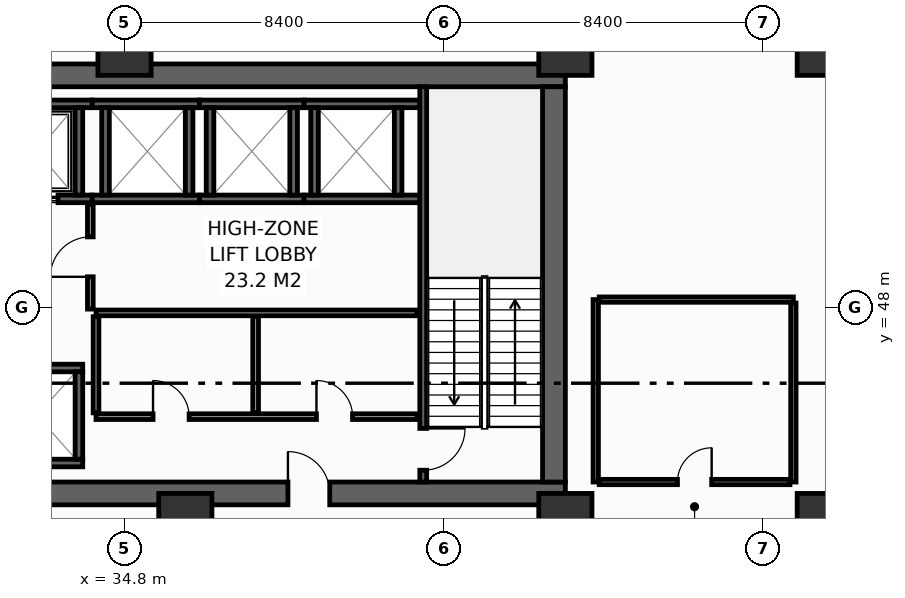
"""IFC4 building model, lengths in metres.
Left out: names, types, materials, properties, quantities, classifications, styles, units other than length and angle.
Written with IfcOpenShell. Run it as: python <this file> out.ifc"""

import sys

from ifc_helpers import new_model, si_unit, direction, frame, frame_2d, origin, origin_2d, place, context, subcontext, project, spatial, rectangle, hollow_rectangle, extrude, element, fill, save


model = new_model("IFC4")
c1 = context("Model", 3, precision=1e-05, world=origin(), true_north=direction((0.0, 1.0)))
c2 = subcontext(c1, "Body", "Model", "MODEL_VIEW")
j1 = project(units=[si_unit("LENGTHUNIT", "METRE"), si_unit("PLANEANGLEUNIT", "RADIAN")], contexts=[c1])
p1 = place(None, origin())
s1 = spatial("IfcSite", under=j1, at=p1, CompositionType="ELEMENT")
p2 = place(p1, origin())
s2 = spatial("IfcBuilding", under=s1, at=p2, CompositionType="ELEMENT")
p3 = place(p2, frame((0.0, 0.0, 11.4)))
s3 = spatial("IfcBuildingStorey", under=s2, at=p3, CompositionType="ELEMENT", Elevation=11.4)
p4 = place(p3, frame((13.5, 43.1, 0.0), z_axis=(0.0, 0.0, 1.0), x_axis=(1.0, 0.0, 0.0)))
e1 = element("IfcWall", 1, at=p4, inside=s3, PredefinedType="SHEAR", context=c2, shape_type="SweptSolid", body=[
    extrude(rectangle(XDim=32.9, YDim=0.6, at=frame_2d((16.45, 0.0))), origin(), (0.0, 0.0, 1.0), 5.1),
])
p5 = place(p4, frame((5.4, 0.0, 0.0)))
e2 = element("IfcOpeningElement", 2, at=p5, cuts=e1, PredefinedType="OPENING", context=c2, shape_type="SweptSolid", body=[
    extrude(rectangle(XDim=1.1, YDim=2.15, at=frame_2d((0.55, 1.075))), frame((0.0, 0.31, 0.0), z_axis=(0.0, -1.0, 0.0), x_axis=(1.0, 0.0, 0.0)), (0.0, 0.0, 1.0), 0.62),
])
p6 = place(p4, frame((25.6, 0.0, 0.0)))
e3 = element("IfcOpeningElement", 3, at=p6, cuts=e1, PredefinedType="OPENING", context=c2, shape_type="SweptSolid", body=[
    extrude(rectangle(XDim=1.1, YDim=2.15, at=frame_2d((0.55, 1.075))), frame((0.0, 0.31, 0.0), z_axis=(0.0, -1.0, 0.0), x_axis=(1.0, 0.0, 0.0)), (0.0, 0.0, 1.0), 0.62),
])
p7 = place(p3, frame((13.5, 54.1, 0.0), z_axis=(0.0, 0.0, 1.0), x_axis=(1.0, 0.0, 0.0)))
e4 = element("IfcWall", 4, at=p7, inside=s3, PredefinedType="SHEAR", context=c2, shape_type="SweptSolid", body=[
    extrude(rectangle(XDim=32.9, YDim=0.6, at=frame_2d((16.45, 0.0))), origin(), (0.0, 0.0, 1.0), 5.1),
])
p8 = place(p3, frame((46.1, 43.4, 0.0), z_axis=(0.0, 0.0, 1.0), x_axis=(0.0, 1.0, 0.0)))
e5 = element("IfcWall", 5, at=p8, inside=s3, PredefinedType="SHEAR", context=c2, shape_type="SweptSolid", body=[
    extrude(rectangle(XDim=10.4, YDim=0.6, at=frame_2d((5.2, 0.0))), origin(), (0.0, 0.0, 1.0), 5.1),
])
for number, where, z_axis, x_axis in (
    (6, (34.8, 54.8, 0.0), (0.0, 0.0, 1.0), (1.0, 0.0, 0.0)),
    (7, (46.4, 54.8, 0.0), (0.0, 0.0, 1.0), (1.0, 0.0, 0.0)),
    (8, (53.2, 54.8, 0.0), (0.0, 0.0, 1.0), (1.0, 0.0, 0.0)),
    (9, (36.4, 42.4, 0.0), (0.0, 0.0, 1.0), (1.0, 0.0, 0.0)),
    (10, (46.4, 42.4, 0.0), (0.0, 0.0, 1.0), (1.0, 0.0, 0.0)),
    (11, (53.2, 42.4, 0.0), (0.0, 0.0, 1.0), (1.0, 0.0, 0.0)),
):
    element("IfcColumn", number, at=place(p3, frame(where, z_axis=z_axis, x_axis=x_axis)), inside=s3, PredefinedType="COLUMN", context=c2, shape_type="SweptSolid", body=[
        extrude(hollow_rectangle(XDim=1.4, YDim=1.4, WallThickness=0.065, at=origin_2d()), origin(), (0.0, 0.0, 1.0), 5.4),
    ])
p9 = place(p3, frame((31.125, 50.85, 0.0), z_axis=(0.0, 0.0, 1.0), x_axis=(1.0, 0.0, 0.0)))
e12 = element("IfcWall", 12, at=p9, inside=s3, PredefinedType="SHEAR", context=c2, shape_type="SweptSolid", body=[
    extrude(rectangle(XDim=2.825, YDim=0.2, at=frame_2d((1.413, 0.0))), origin(), (0.0, 0.0, 1.0), 5.1),
])
p10 = place(p9, frame((0.825, 0.0, 0.0)))
e13 = element("IfcOpeningElement", 13, at=p10, cuts=e12, PredefinedType="OPENING", context=c2, shape_type="SweptSolid", body=[
    extrude(rectangle(XDim=1.1, YDim=2.2, at=frame_2d((0.55, 1.1))), frame((0.0, 0.11, 0.0), z_axis=(0.0, -1.0, 0.0), x_axis=(1.0, 0.0, 0.0)), (0.0, 0.0, 1.0), 0.22),
])
p11 = place(p3, frame((31.125, 53.35, 0.0), z_axis=(0.0, 0.0, 1.0), x_axis=(1.0, 0.0, 0.0)))
e14 = element("IfcWall", 14, at=p11, inside=s3, PredefinedType="SHEAR", context=c2, shape_type="SweptSolid", body=[
    extrude(rectangle(XDim=2.825, YDim=0.2, at=frame_2d((1.413, 0.0))), origin(), (0.0, 0.0, 1.0), 5.1),
])
p12 = place(p3, frame((33.6, 50.95, 0.0), z_axis=(0.0, 0.0, 1.0), x_axis=(0.0, 1.0, 0.0)))
e15 = element("IfcWall", 15, at=p12, inside=s3, PredefinedType="SHEAR", context=c2, shape_type="SweptSolid", body=[
    extrude(rectangle(XDim=2.3, YDim=0.2, at=frame_2d((1.15, 0.0))), origin(), (0.0, 0.0, 1.0), 5.1),
])
for number, where, z_axis, x_axis in (
    (16, (31.125, 43.9, 0.0), (0.0, 0.0, 1.0), (1.0, 0.0, 0.0)),
    (17, (31.125, 46.4, 0.0), (0.0, 0.0, 1.0), (1.0, 0.0, 0.0)),
):
    element("IfcWall", number, at=place(p3, frame(where, z_axis=z_axis, x_axis=x_axis)), inside=s3, PredefinedType="SHEAR", context=c2, shape_type="SweptSolid", body=[
        extrude(rectangle(XDim=2.575, YDim=0.2, at=frame_2d((1.288, 0.0))), origin(), (0.0, 0.0, 1.0), 5.1),
    ])
p13 = place(p3, frame((33.6, 44.0, 0.0), z_axis=(0.0, 0.0, 1.0), x_axis=(0.0, 1.0, 0.0)))
e18 = element("IfcWall", 18, at=p13, inside=s3, PredefinedType="SHEAR", context=c2, shape_type="SweptSolid", body=[
    extrude(rectangle(XDim=2.3, YDim=0.2, at=frame_2d((1.15, 0.0))), origin(), (0.0, 0.0, 1.0), 5.1),
])
for number, where, z_axis, x_axis in (
    (19, (33.95, 50.85, 0.0), (0.0, 0.0, 1.0), (1.0, 0.0, 0.0)),
    (20, (33.95, 53.35, 0.0), (0.0, 0.0, 1.0), (1.0, 0.0, 0.0)),
):
    element("IfcWall", number, at=place(p3, frame(where, z_axis=z_axis, x_axis=x_axis)), inside=s3, PredefinedType="SHEAR", context=c2, shape_type="SweptSolid", body=[
        extrude(rectangle(XDim=2.825, YDim=0.2, at=frame_2d((1.413, 0.0))), origin(), (0.0, 0.0, 1.0), 5.1),
    ])
for number, where, z_axis, x_axis in (
    (21, (34.3, 50.95, 0.0), (0.0, 0.0, 1.0), (0.0, 1.0, 0.0)),
    (22, (36.5, 50.95, 0.0), (0.0, 0.0, 1.0), (0.0, 1.0, 0.0)),
):
    element("IfcWall", number, at=place(p3, frame(where, z_axis=z_axis, x_axis=x_axis)), inside=s3, PredefinedType="SHEAR", context=c2, shape_type="SweptSolid", body=[
        extrude(rectangle(XDim=2.3, YDim=0.2, at=frame_2d((1.15, 0.0))), origin(), (0.0, 0.0, 1.0), 5.1),
    ])
for number, where, z_axis, x_axis in (
    (23, (36.775, 50.85, 0.0), (0.0, 0.0, 1.0), (1.0, 0.0, 0.0)),
    (24, (36.775, 53.35, 0.0), (0.0, 0.0, 1.0), (1.0, 0.0, 0.0)),
):
    element("IfcWall", number, at=place(p3, frame(where, z_axis=z_axis, x_axis=x_axis)), inside=s3, PredefinedType="SHEAR", context=c2, shape_type="SweptSolid", body=[
        extrude(rectangle(XDim=2.75, YDim=0.2, at=frame_2d((1.375, 0.0))), origin(), (0.0, 0.0, 1.0), 5.1),
    ])
for number, where, z_axis, x_axis in (
    (25, (37.05, 50.95, 0.0), (0.0, 0.0, 1.0), (0.0, 1.0, 0.0)),
    (26, (39.25, 50.95, 0.0), (0.0, 0.0, 1.0), (0.0, 1.0, 0.0)),
):
    element("IfcWall", number, at=place(p3, frame(where, z_axis=z_axis, x_axis=x_axis)), inside=s3, PredefinedType="SHEAR", context=c2, shape_type="SweptSolid", body=[
        extrude(rectangle(XDim=2.3, YDim=0.2, at=frame_2d((1.15, 0.0))), origin(), (0.0, 0.0, 1.0), 5.1),
    ])
for number, where, z_axis, x_axis in (
    (27, (39.525, 50.85, 0.0), (0.0, 0.0, 1.0), (1.0, 0.0, 0.0)),
    (28, (39.525, 53.35, 0.0), (0.0, 0.0, 1.0), (1.0, 0.0, 0.0)),
):
    element("IfcWall", number, at=place(p3, frame(where, z_axis=z_axis, x_axis=x_axis)), inside=s3, PredefinedType="SHEAR", context=c2, shape_type="SweptSolid", body=[
        extrude(rectangle(XDim=3.045, YDim=0.2, at=frame_2d((1.522, 0.0))), origin(), (0.0, 0.0, 1.0), 5.1),
    ])
for number, where, z_axis, x_axis in (
    (29, (39.8, 50.95, 0.0), (0.0, 0.0, 1.0), (0.0, 1.0, 0.0)),
    (30, (42.0, 50.95, 0.0), (0.0, 0.0, 1.0), (0.0, 1.0, 0.0)),
):
    element("IfcWall", number, at=place(p3, frame(where, z_axis=z_axis, x_axis=x_axis)), inside=s3, PredefinedType="SHEAR", context=c2, shape_type="SweptSolid", body=[
        extrude(rectangle(XDim=2.3, YDim=0.2, at=frame_2d((1.15, 0.0))), origin(), (0.0, 0.0, 1.0), 5.1),
    ])
p14 = place(p3, frame((42.66, 53.8, 0.0), z_axis=(0.0, 0.0, 1.0), x_axis=(0.0, -1.0, 0.0)))
e31 = element("IfcWall", 31, at=p14, inside=s3, PredefinedType="SHEAR", context=c2, shape_type="SweptSolid", body=[
    extrude(rectangle(XDim=10.4, YDim=0.18, at=frame_2d((5.2, 0.0))), origin(), (0.0, 0.0, 1.0), 5.1),
])
p15 = place(p14, frame((8.99, 0.0, 0.0)))
e32 = element("IfcOpeningElement", 32, at=p15, cuts=e31, PredefinedType="OPENING", context=c2, shape_type="SweptSolid", body=[
    extrude(rectangle(XDim=1.1, YDim=2.15, at=frame_2d((0.55, 1.075))), frame((0.0, 0.1, 0.0), z_axis=(0.0, -1.0, 0.0), x_axis=(1.0, 0.0, 0.0)), (0.0, 0.0, 1.0), 0.2),
])
p16 = place(p3, frame((33.9, 47.95, 0.0), z_axis=(0.0, 0.0, 1.0), x_axis=(0.0, 1.0, 0.0)))
e33 = element("IfcWall", 33, at=p16, inside=s3, PredefinedType="PARTITIONING", context=c2, shape_type="SweptSolid", body=[
    extrude(rectangle(XDim=2.75, YDim=0.15, at=frame_2d((1.375, 0.0))), origin(), (0.0, 0.0, 1.0), 5.1),
])
p17 = place(p16, frame((0.85, 0.0, 0.0)))
e34 = element("IfcOpeningElement", 34, at=p17, cuts=e33, PredefinedType="OPENING", context=c2, shape_type="SweptSolid", body=[
    extrude(rectangle(XDim=1.05, YDim=2.15, at=frame_2d((0.525, 1.075))), frame((0.0, 0.085, 0.0), z_axis=(0.0, -1.0, 0.0), x_axis=(1.0, 0.0, 0.0)), (0.0, 0.0, 1.0), 0.17),
])
p18 = place(p3, frame((34.05, 45.12, 0.0), z_axis=(0.0, 0.0, 1.0), x_axis=(1.0, 0.0, 0.0)))
e35 = element("IfcWall", 35, at=p18, inside=s3, PredefinedType="PARTITIONING", context=c2, shape_type="SweptSolid", body=[
    extrude(rectangle(XDim=8.45, YDim=0.15, at=frame_2d((4.225, 0.0))), origin(), (0.0, 0.0, 1.0), 5.1),
])
p19 = place(p18, frame((1.5, 0.0, 0.0)))
e36 = element("IfcOpeningElement", 36, at=p19, cuts=e35, PredefinedType="OPENING", context=c2, shape_type="SweptSolid", body=[
    extrude(rectangle(XDim=0.95, YDim=2.15, at=frame_2d((0.475, 1.075))), frame((0.0, 0.085, 0.0), z_axis=(0.0, -1.0, 0.0), x_axis=(1.0, 0.0, 0.0)), (0.0, 0.0, 1.0), 0.17),
])
p20 = place(p18, frame((5.8, 0.0, 0.0)))
e37 = element("IfcOpeningElement", 37, at=p20, cuts=e35, PredefinedType="OPENING", context=c2, shape_type="SweptSolid", body=[
    extrude(rectangle(XDim=0.95, YDim=2.15, at=frame_2d((0.475, 1.075))), frame((0.0, 0.085, 0.0), z_axis=(0.0, -1.0, 0.0), x_axis=(1.0, 0.0, 0.0)), (0.0, 0.0, 1.0), 0.17),
])
p21 = place(p3, frame((34.05, 47.85, 0.0), z_axis=(0.0, 0.0, 1.0), x_axis=(1.0, 0.0, 0.0)))
e38 = element("IfcWall", 38, at=p21, inside=s3, PredefinedType="PARTITIONING", context=c2, shape_type="SweptSolid", body=[
    extrude(rectangle(XDim=8.45, YDim=0.15, at=frame_2d((4.225, 0.0))), origin(), (0.0, 0.0, 1.0), 5.1),
])
for number, where, z_axis, x_axis in (
    (39, (38.25, 45.22, 0.0), (0.0, 0.0, 1.0), (0.0, 1.0, 0.0)),
    (40, (34.05, 45.22, 0.0), (0.0, 0.0, 1.0), (0.0, 1.0, 0.0)),
):
    element("IfcWall", number, at=place(p3, frame(where, z_axis=z_axis, x_axis=x_axis)), inside=s3, PredefinedType="PARTITIONING", context=c2, shape_type="SweptSolid", body=[
        extrude(rectangle(XDim=2.53, YDim=0.15, at=frame_2d((1.265, 0.0))), origin(), (0.0, 0.0, 1.0), 5.1),
    ])
p22 = place(p3, frame((47.2, 43.4, 0.0), z_axis=(0.0, 0.0, 1.0), x_axis=(0.0, 1.0, 0.0)))
e41 = element("IfcWall", 41, at=p22, inside=s3, PredefinedType="PARTITIONING", context=c2, shape_type="SweptSolid", body=[
    extrude(rectangle(XDim=4.8, YDim=0.14, at=frame_2d((2.4, 0.0))), origin(), (0.0, 0.0, 1.0), 5.1),
])
p23 = place(p3, frame((47.29, 48.2, 0.0), z_axis=(0.0, 0.0, 1.0), x_axis=(1.0, 0.0, 0.0)))
e42 = element("IfcWall", 42, at=p23, inside=s3, PredefinedType="PARTITIONING", context=c2, shape_type="SweptSolid", body=[
    extrude(rectangle(XDim=5.11, YDim=0.14, at=frame_2d((2.555, 0.0))), origin(), (0.0, 0.0, 1.0), 5.1),
])
p24 = place(p3, frame((52.4, 43.4, 0.0), z_axis=(0.0, 0.0, 1.0), x_axis=(0.0, 1.0, 0.0)))
e43 = element("IfcWall", 43, at=p24, inside=s3, PredefinedType="PARTITIONING", context=c2, shape_type="SweptSolid", body=[
    extrude(rectangle(XDim=4.71, YDim=0.14, at=frame_2d((2.355, 0.0))), origin(), (0.0, 0.0, 1.0), 5.1),
])
p25 = place(p3, frame((47.29, 43.4, 0.0), z_axis=(0.0, 0.0, 1.0), x_axis=(1.0, 0.0, 0.0)))
e44 = element("IfcWall", 44, at=p25, inside=s3, PredefinedType="PARTITIONING", context=c2, shape_type="SweptSolid", body=[
    extrude(rectangle(XDim=5.02, YDim=0.14, at=frame_2d((2.51, 0.0))), origin(), (0.0, 0.0, 1.0), 5.1),
])
p26 = place(p25, frame((2.06, 0.0, 0.0)))
e45 = element("IfcOpeningElement", 45, at=p26, cuts=e44, PredefinedType="OPENING", context=c2, shape_type="SweptSolid", body=[
    extrude(rectangle(XDim=0.9, YDim=2.1, at=frame_2d((0.45, 1.05))), frame((0.0, 0.08, 0.0), z_axis=(0.0, -1.0, 0.0), x_axis=(1.0, 0.0, 0.0)), (0.0, 0.0, 1.0), 0.16),
])
p27 = place(p10, origin())
e46 = element("IfcDoor", 46, at=p27, inside=s3, OperationType="SLIDING_TO_LEFT", PredefinedType="DOOR", context=c2, shape_type="SweptSolid", body=[
    extrude(rectangle(XDim=1.1, YDim=2.2, at=frame_2d((0.55, 1.1))), frame((0.0, 0.025, 0.0), z_axis=(0.0, -1.0, 0.0), x_axis=(1.0, 0.0, 0.0)), (0.0, 0.0, 1.0), 0.05),
])
fill(e13, e46)
p28 = place(p15, origin())
e47 = element("IfcDoor", 47, at=p28, inside=s3, OperationType="SINGLE_SWING_LEFT", PredefinedType="DOOR", context=c2, shape_type="SweptSolid", body=[
    extrude(rectangle(XDim=1.1, YDim=2.15, at=frame_2d((0.55, 1.075))), frame((0.0, 0.025, 0.0), z_axis=(0.0, -1.0, 0.0), x_axis=(1.0, 0.0, 0.0)), (0.0, 0.0, 1.0), 0.05),
])
fill(e32, e47)
p29 = place(p6, origin())
e48 = element("IfcDoor", 48, at=p29, inside=s3, OperationType="SINGLE_SWING_LEFT", PredefinedType="DOOR", context=c2, shape_type="SweptSolid", body=[
    extrude(rectangle(XDim=1.1, YDim=2.15, at=frame_2d((0.55, 1.075))), frame((0.0, 0.025, 0.0), z_axis=(0.0, -1.0, 0.0), x_axis=(1.0, 0.0, 0.0)), (0.0, 0.0, 1.0), 0.05),
])
fill(e3, e48)
p30 = place(p17, origin())
e49 = element("IfcDoor", 49, at=p30, inside=s3, OperationType="SINGLE_SWING_LEFT", PredefinedType="DOOR", context=c2, shape_type="SweptSolid", body=[
    extrude(rectangle(XDim=1.05, YDim=2.15, at=frame_2d((0.525, 1.075))), frame((0.0, 0.025, 0.0), z_axis=(0.0, -1.0, 0.0), x_axis=(1.0, 0.0, 0.0)), (0.0, 0.0, 1.0), 0.05),
])
fill(e34, e49)
p31 = place(p19, origin())
e50 = element("IfcDoor", 50, at=p31, inside=s3, OperationType="SINGLE_SWING_LEFT", PredefinedType="DOOR", context=c2, shape_type="SweptSolid", body=[
    extrude(rectangle(XDim=0.95, YDim=2.15, at=frame_2d((0.475, 1.075))), frame((0.0, 0.025, 0.0), z_axis=(0.0, -1.0, 0.0), x_axis=(1.0, 0.0, 0.0)), (0.0, 0.0, 1.0), 0.05),
])
fill(e36, e50)
p32 = place(p20, origin())
e51 = element("IfcDoor", 51, at=p32, inside=s3, OperationType="SINGLE_SWING_LEFT", PredefinedType="DOOR", context=c2, shape_type="SweptSolid", body=[
    extrude(rectangle(XDim=0.95, YDim=2.15, at=frame_2d((0.475, 1.075))), frame((0.0, 0.025, 0.0), z_axis=(0.0, -1.0, 0.0), x_axis=(1.0, 0.0, 0.0)), (0.0, 0.0, 1.0), 0.05),
])
fill(e37, e51)
p33 = place(p26, origin())
e52 = element("IfcDoor", 52, at=p33, inside=s3, OperationType="SINGLE_SWING_RIGHT", PredefinedType="DOOR", context=c2, shape_type="SweptSolid", body=[
    extrude(rectangle(XDim=0.9, YDim=2.1, at=frame_2d((0.45, 1.05))), frame((0.0, 0.025, 0.0), z_axis=(0.0, -1.0, 0.0), x_axis=(1.0, 0.0, 0.0)), (0.0, 0.0, 1.0), 0.05),
])
fill(e45, e52)
save(model, sys.argv[1])
